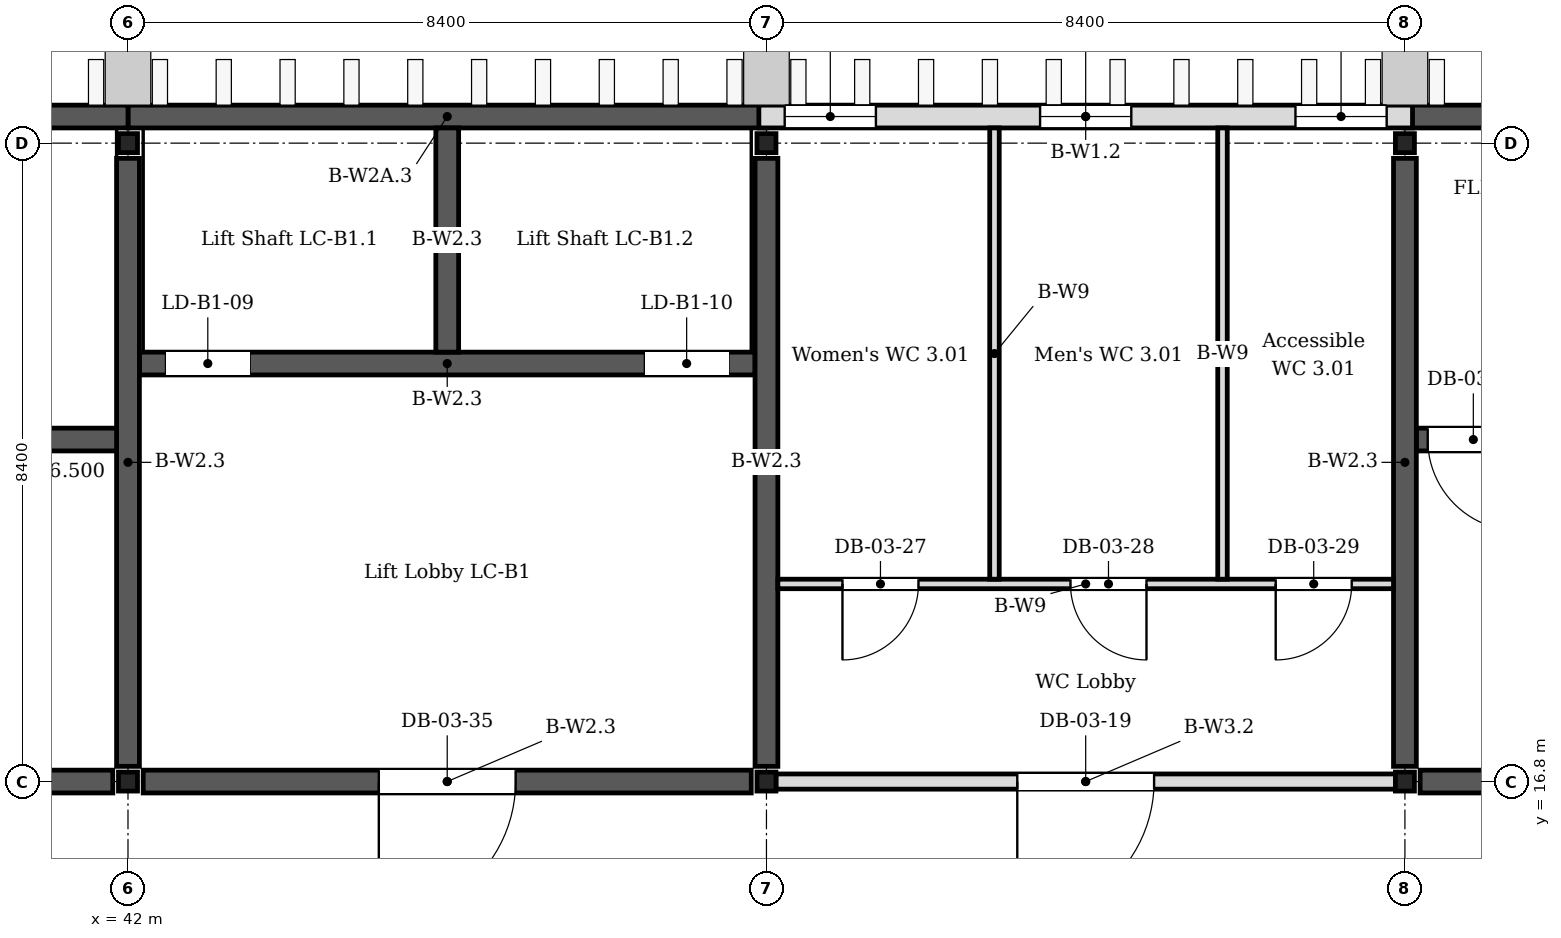
"""IFC4 building model, lengths in metres.
Left out: names, types, materials, properties, quantities, classifications, styles, units other than length and angle.
Written with IfcOpenShell. Run it as: python <this file> out.ifc"""

import sys

from ifc_helpers import new_model, si_unit, direction, frame, frame_2d, origin, origin_2d, place, context, subcontext, project, spatial, rectangle, i_section, extrude, element, fill, save


model = new_model("IFC4")
c1 = context("Model", 3, precision=1e-05, world=origin(), true_north=direction((0.0, 1.0)))
c2 = subcontext(c1, "Body", "Model", "MODEL_VIEW")
j1 = project(units=[si_unit("LENGTHUNIT", "METRE"), si_unit("PLANEANGLEUNIT", "RADIAN")], contexts=[c1])
p1 = place(None, origin())
s1 = spatial("IfcSite", under=j1, at=p1, CompositionType="ELEMENT")
p2 = place(p1, origin())
s2 = spatial("IfcBuilding", under=s1, at=p2, CompositionType="ELEMENT")
p3 = place(p2, frame((0.0, 0.0, 14.4)))
s3 = spatial("IfcBuildingStorey", under=s2, at=p3, CompositionType="ELEMENT", Elevation=14.4)
for number, where, z_axis, x_axis in (
    (1, (42.0, 16.8, 0.0), (0.0, 0.0, 1.0), (1.0, 0.0, 0.0)),
    (2, (42.0, 25.2, 0.0), (0.0, 0.0, 1.0), (1.0, 0.0, 0.0)),
    (3, (50.4, 16.8, 0.0), (0.0, 0.0, 1.0), (1.0, 0.0, 0.0)),
    (4, (50.4, 25.2, 0.0), (0.0, 0.0, 1.0), (1.0, 0.0, 0.0)),
    (5, (58.8, 16.8, 0.0), (0.0, 0.0, 1.0), (1.0, 0.0, 0.0)),
    (6, (58.8, 25.2, 0.0), (0.0, 0.0, 1.0), (1.0, 0.0, 0.0)),
):
    element("IfcColumn", number, at=place(p3, frame(where, z_axis=z_axis, x_axis=x_axis)), inside=s3, PredefinedType="COLUMN", context=c2, shape_type="SweptSolid", body=[
        extrude(i_section(OverallWidth=0.25, OverallDepth=0.25, WebThickness=0.009, FlangeThickness=0.014, FilletRadius=0.013, at=origin_2d()), origin(), (0.0, 0.0, 1.0), 3.95),
    ])
for number, where, z_axis, x_axis in (
    (7, (42.0, 17.0, 0.0), (0.0, 0.0, 1.0), (0.0, 1.0, 0.0)),
    (8, (50.4, 17.0, 0.0), (0.0, 0.0, 1.0), (0.0, 1.0, 0.0)),
):
    element("IfcWall", number, at=place(p3, frame(where, z_axis=z_axis, x_axis=x_axis)), inside=s3, PredefinedType="SHEAR", context=c2, shape_type="SweptSolid", body=[
        extrude(rectangle(XDim=8.0, YDim=0.3, at=frame_2d((4.0, 0.0))), origin(), (0.0, 0.0, 1.0), 3.95),
    ])
p4 = place(p3, frame((42.2, 16.8, 0.0), z_axis=(0.0, 0.0, 1.0), x_axis=(1.0, 0.0, 0.0)))
e9 = element("IfcWall", 9, at=p4, inside=s3, PredefinedType="SHEAR", context=c2, shape_type="SweptSolid", body=[
    extrude(rectangle(XDim=8.0, YDim=0.3, at=frame_2d((4.0, 0.0))), origin(), (0.0, 0.0, 1.0), 3.95),
])
p5 = place(p4, frame((3.1, 0.0, 0.0)))
e10 = element("IfcOpeningElement", 10, at=p5, cuts=e9, PredefinedType="OPENING", context=c2, shape_type="SweptSolid", body=[
    extrude(rectangle(XDim=1.8, YDim=2.1, at=frame_2d((0.9, 1.05))), frame((0.0, 0.16, 0.0), z_axis=(0.0, -1.0, 0.0), x_axis=(1.0, 0.0, 0.0)), (0.0, 0.0, 1.0), 0.32),
])
p6 = place(p3, frame((42.15, 22.3, 0.0), z_axis=(0.0, 0.0, 1.0), x_axis=(1.0, 0.0, 0.0)))
e11 = element("IfcWall", 11, at=p6, inside=s3, PredefinedType="SHEAR", context=c2, shape_type="SweptSolid", body=[
    extrude(rectangle(XDim=8.1, YDim=0.3, at=frame_2d((4.05, 0.0))), origin(), (0.0, 0.0, 1.0), 3.95),
])
p7 = place(p6, frame((0.35, 0.0, 0.0)))
e12 = element("IfcOpeningElement", 12, at=p7, cuts=e11, PredefinedType="OPENING", context=c2, shape_type="SweptSolid", body=[
    extrude(rectangle(XDim=1.1, YDim=2.2, at=frame_2d((0.55, 1.1))), frame((0.0, 0.16, 0.0), z_axis=(0.0, -1.0, 0.0), x_axis=(1.0, 0.0, 0.0)), (0.0, 0.0, 1.0), 0.32),
])
p8 = place(p6, frame((6.65, 0.0, 0.0)))
e13 = element("IfcOpeningElement", 13, at=p8, cuts=e11, PredefinedType="OPENING", context=c2, shape_type="SweptSolid", body=[
    extrude(rectangle(XDim=1.1, YDim=2.2, at=frame_2d((0.55, 1.1))), frame((0.0, 0.16, 0.0), z_axis=(0.0, -1.0, 0.0), x_axis=(1.0, 0.0, 0.0)), (0.0, 0.0, 1.0), 0.32),
])
p9 = place(p3, frame((42.0, 25.55, 0.0), z_axis=(0.0, 0.0, 1.0), x_axis=(1.0, 0.0, 0.0)))
e14 = element("IfcWall", 14, at=p9, inside=s3, PredefinedType="SHEAR", context=c2, shape_type="SweptSolid", body=[
    extrude(rectangle(XDim=8.4, YDim=0.3, at=frame_2d((4.2, 0.0))), origin(), (0.0, 0.0, 1.0), 3.95),
])
p10 = place(p3, frame((46.2, 22.45, 0.0), z_axis=(0.0, 0.0, 1.0), x_axis=(0.0, 1.0, 0.0)))
e15 = element("IfcWall", 15, at=p10, inside=s3, PredefinedType="SHEAR", context=c2, shape_type="SweptSolid", body=[
    extrude(rectangle(XDim=2.95, YDim=0.3, at=frame_2d((1.475, 0.0))), origin(), (0.0, 0.0, 1.0), 3.95),
])
p11 = place(p3, frame((33.8, 16.8, 0.0), z_axis=(0.0, 0.0, 1.0), x_axis=(1.0, 0.0, 0.0)))
e16 = element("IfcWall", 16, at=p11, inside=s3, PredefinedType="SHEAR", context=c2, shape_type="SweptSolid", body=[
    extrude(rectangle(XDim=8.0, YDim=0.3, at=frame_2d((4.0, 0.0))), origin(), (0.0, 0.0, 1.0), 3.95),
])
p12 = place(p11, frame((3.1, 0.0, 0.0)))
e17 = element("IfcOpeningElement", 17, at=p12, cuts=e16, PredefinedType="OPENING", context=c2, shape_type="SweptSolid", body=[
    extrude(rectangle(XDim=1.8, YDim=2.1, at=frame_2d((0.9, 1.05))), frame((0.0, 0.16, 0.0), z_axis=(0.0, -1.0, 0.0), x_axis=(1.0, 0.0, 0.0)), (0.0, 0.0, 1.0), 0.32),
])
p13 = place(p3, frame((33.75, 21.3, 0.0), z_axis=(0.0, 0.0, 1.0), x_axis=(1.0, 0.0, 0.0)))
e18 = element("IfcWall", 18, at=p13, inside=s3, PredefinedType="SHEAR", context=c2, shape_type="SweptSolid", body=[
    extrude(rectangle(XDim=8.1, YDim=0.3, at=frame_2d((4.05, 0.0))), origin(), (0.0, 0.0, 1.0), 3.95),
])
p14 = place(p13, frame((0.15, 0.0, 0.0)))
e19 = element("IfcOpeningElement", 19, at=p14, cuts=e18, PredefinedType="OPENING", context=c2, shape_type="SweptSolid", body=[
    extrude(rectangle(XDim=1.2, YDim=2.1, at=frame_2d((0.6, 1.05))), frame((0.0, 0.16, 0.0), z_axis=(0.0, -1.0, 0.0), x_axis=(1.0, 0.0, 0.0)), (0.0, 0.0, 1.0), 0.32),
])
p15 = place(p3, frame((33.6, 25.55, 0.0), z_axis=(0.0, 0.0, 1.0), x_axis=(1.0, 0.0, 0.0)))
e20 = element("IfcWall", 20, at=p15, inside=s3, PredefinedType="SHEAR", context=c2, shape_type="SweptSolid", body=[
    extrude(rectangle(XDim=8.4, YDim=0.3, at=frame_2d((4.2, 0.0))), origin(), (0.0, 0.0, 1.0), 3.95),
])
p16 = place(p3, frame((58.8, 17.0, 0.0), z_axis=(0.0, 0.0, 1.0), x_axis=(0.0, 1.0, 0.0)))
e21 = element("IfcWall", 21, at=p16, inside=s3, PredefinedType="SHEAR", context=c2, shape_type="SweptSolid", body=[
    extrude(rectangle(XDim=8.0, YDim=0.3, at=frame_2d((4.0, 0.0))), origin(), (0.0, 0.0, 1.0), 3.95),
])
p17 = place(p3, frame((59.0, 16.8, 0.0), z_axis=(0.0, 0.0, 1.0), x_axis=(1.0, 0.0, 0.0)))
e22 = element("IfcWall", 22, at=p17, inside=s3, PredefinedType="SHEAR", context=c2, shape_type="SweptSolid", body=[
    extrude(rectangle(XDim=8.0, YDim=0.3, at=frame_2d((4.0, 0.0))), origin(), (0.0, 0.0, 1.0), 3.95),
])
p18 = place(p17, frame((3.1, 0.0, 0.0)))
e23 = element("IfcOpeningElement", 23, at=p18, cuts=e22, PredefinedType="OPENING", context=c2, shape_type="SweptSolid", body=[
    extrude(rectangle(XDim=1.8, YDim=2.1, at=frame_2d((0.9, 1.05))), frame((0.0, 0.16, 0.0), z_axis=(0.0, -1.0, 0.0), x_axis=(1.0, 0.0, 0.0)), (0.0, 0.0, 1.0), 0.32),
])
p19 = place(p3, frame((58.95, 21.3, 0.0), z_axis=(0.0, 0.0, 1.0), x_axis=(1.0, 0.0, 0.0)))
e24 = element("IfcWall", 24, at=p19, inside=s3, PredefinedType="SHEAR", context=c2, shape_type="SweptSolid", body=[
    extrude(rectangle(XDim=8.1, YDim=0.3, at=frame_2d((4.05, 0.0))), origin(), (0.0, 0.0, 1.0), 3.95),
])
p20 = place(p19, frame((0.15, 0.0, 0.0)))
e25 = element("IfcOpeningElement", 25, at=p20, cuts=e24, PredefinedType="OPENING", context=c2, shape_type="SweptSolid", body=[
    extrude(rectangle(XDim=1.2, YDim=2.1, at=frame_2d((0.6, 1.05))), frame((0.0, 0.16, 0.0), z_axis=(0.0, -1.0, 0.0), x_axis=(1.0, 0.0, 0.0)), (0.0, 0.0, 1.0), 0.32),
])
p21 = place(p3, frame((58.8, 25.55, 0.0), z_axis=(0.0, 0.0, 1.0), x_axis=(1.0, 0.0, 0.0)))
e26 = element("IfcWall", 26, at=p21, inside=s3, PredefinedType="SHEAR", context=c2, shape_type="SweptSolid", body=[
    extrude(rectangle(XDim=8.4, YDim=0.3, at=frame_2d((4.2, 0.0))), origin(), (0.0, 0.0, 1.0), 3.95),
])
p22 = place(p3, frame((50.3, 25.55, 0.0), z_axis=(0.0, 0.0, 1.0), x_axis=(1.0, 0.0, 0.0)))
e27 = element("IfcWall", 27, at=p22, inside=s3, PredefinedType="SOLIDWALL", context=c2, shape_type="SweptSolid", body=[
    extrude(rectangle(XDim=8.6, YDim=0.3, at=frame_2d((4.3, 0.0))), origin(), (0.0, 0.0, 1.0), 3.95),
])
p23 = place(p22, frame((0.34, 0.0, 1.5)))
e28 = element("IfcOpeningElement", 28, at=p23, cuts=e27, PredefinedType="OPENING", context=c2, shape_type="SweptSolid", body=[
    extrude(rectangle(XDim=1.2, YDim=1.2, at=frame_2d((0.6, 0.6))), frame((0.0, 0.16, 0.0), z_axis=(0.0, -1.0, 0.0), x_axis=(1.0, 0.0, 0.0)), (0.0, 0.0, 1.0), 0.32),
])
p24 = place(p22, frame((3.7, 0.0, 1.5)))
e29 = element("IfcOpeningElement", 29, at=p24, cuts=e27, PredefinedType="OPENING", context=c2, shape_type="SweptSolid", body=[
    extrude(rectangle(XDim=1.2, YDim=1.2, at=frame_2d((0.6, 0.6))), frame((0.0, 0.16, 0.0), z_axis=(0.0, -1.0, 0.0), x_axis=(1.0, 0.0, 0.0)), (0.0, 0.0, 1.0), 0.32),
])
p25 = place(p22, frame((7.06, 0.0, 1.5)))
e30 = element("IfcOpeningElement", 30, at=p25, cuts=e27, PredefinedType="OPENING", context=c2, shape_type="SweptSolid", body=[
    extrude(rectangle(XDim=1.2, YDim=1.2, at=frame_2d((0.6, 0.6))), frame((0.0, 0.16, 0.0), z_axis=(0.0, -1.0, 0.0), x_axis=(1.0, 0.0, 0.0)), (0.0, 0.0, 1.0), 0.32),
])
p26 = place(p3, frame((50.525, 16.8, 0.0), z_axis=(0.0, 0.0, 1.0), x_axis=(1.0, 0.0, 0.0)))
e31 = element("IfcWall", 31, at=p26, inside=s3, PredefinedType="PARTITIONING", context=c2, shape_type="SweptSolid", body=[
    extrude(rectangle(XDim=8.15, YDim=0.2, at=frame_2d((4.075, 0.0))), origin(), (0.0, 0.0, 1.0), 3.25),
])
p27 = place(p26, frame((3.175, 0.0, 0.0)))
e32 = element("IfcOpeningElement", 32, at=p27, cuts=e31, PredefinedType="OPENING", context=c2, shape_type="SweptSolid", body=[
    extrude(rectangle(XDim=1.8, YDim=2.1, at=frame_2d((0.9, 1.05))), frame((0.0, 0.11, 0.0), z_axis=(0.0, -1.0, 0.0), x_axis=(1.0, 0.0, 0.0)), (0.0, 0.0, 1.0), 0.22),
])
p28 = place(p3, frame((50.55, 19.4, 0.0), z_axis=(0.0, 0.0, 1.0), x_axis=(1.0, 0.0, 0.0)))
e33 = element("IfcWall", 33, at=p28, inside=s3, PredefinedType="PARTITIONING", context=c2, shape_type="SweptSolid", body=[
    extrude(rectangle(XDim=8.1, YDim=0.125, at=frame_2d((4.05, 0.0))), origin(), (0.0, 0.0, 1.0), 3.25),
])
p29 = place(p28, frame((0.85, 0.0, 0.0)))
e34 = element("IfcOpeningElement", 34, at=p29, cuts=e33, PredefinedType="OPENING", context=c2, shape_type="SweptSolid", body=[
    extrude(rectangle(XDim=1.0, YDim=2.1, at=frame_2d((0.5, 1.05))), frame((0.0, 0.073, 0.0), z_axis=(0.0, -1.0, 0.0), x_axis=(1.0, 0.0, 0.0)), (0.0, 0.0, 1.0), 0.145),
])
p30 = place(p28, frame((3.85, 0.0, 0.0)))
e35 = element("IfcOpeningElement", 35, at=p30, cuts=e33, PredefinedType="OPENING", context=c2, shape_type="SweptSolid", body=[
    extrude(rectangle(XDim=1.0, YDim=2.1, at=frame_2d((0.5, 1.05))), frame((0.0, 0.073, 0.0), z_axis=(0.0, -1.0, 0.0), x_axis=(1.0, 0.0, 0.0)), (0.0, 0.0, 1.0), 0.145),
])
p31 = place(p28, frame((6.55, 0.0, 0.0)))
e36 = element("IfcOpeningElement", 36, at=p31, cuts=e33, PredefinedType="OPENING", context=c2, shape_type="SweptSolid", body=[
    extrude(rectangle(XDim=1.0, YDim=2.1, at=frame_2d((0.5, 1.05))), frame((0.0, 0.073, 0.0), z_axis=(0.0, -1.0, 0.0), x_axis=(1.0, 0.0, 0.0)), (0.0, 0.0, 1.0), 0.145),
])
for number, where, z_axis, x_axis in (
    (37, (53.4, 19.462, 0.0), (0.0, 0.0, 1.0), (0.0, 1.0, 0.0)),
    (38, (56.4, 19.462, 0.0), (0.0, 0.0, 1.0), (0.0, 1.0, 0.0)),
):
    element("IfcWall", number, at=place(p3, frame(where, z_axis=z_axis, x_axis=x_axis)), inside=s3, PredefinedType="PARTITIONING", context=c2, shape_type="SweptSolid", body=[
        extrude(rectangle(XDim=5.938, YDim=0.125, at=frame_2d((2.969, 0.0))), origin(), (0.0, 0.0, 1.0), 3.25),
    ])
p32 = place(p23, origin())
e39 = element("IfcWindow", 39, at=p32, inside=s3, PartitioningType="SINGLE_PANEL", PredefinedType="WINDOW", context=c2, shape_type="SweptSolid", body=[
    extrude(rectangle(XDim=1.2, YDim=1.2, at=frame_2d((0.6, 0.6))), frame((0.0, 0.03, 0.0), z_axis=(0.0, -1.0, 0.0), x_axis=(1.0, 0.0, 0.0)), (0.0, 0.0, 1.0), 0.06),
])
fill(e28, e39)
p33 = place(p24, origin())
e40 = element("IfcWindow", 40, at=p33, inside=s3, PartitioningType="SINGLE_PANEL", PredefinedType="WINDOW", context=c2, shape_type="SweptSolid", body=[
    extrude(rectangle(XDim=1.2, YDim=1.2, at=frame_2d((0.6, 0.6))), frame((0.0, 0.03, 0.0), z_axis=(0.0, -1.0, 0.0), x_axis=(1.0, 0.0, 0.0)), (0.0, 0.0, 1.0), 0.06),
])
fill(e29, e40)
p34 = place(p25, origin())
e41 = element("IfcWindow", 41, at=p34, inside=s3, PartitioningType="SINGLE_PANEL", PredefinedType="WINDOW", context=c2, shape_type="SweptSolid", body=[
    extrude(rectangle(XDim=1.2, YDim=1.2, at=frame_2d((0.6, 0.6))), frame((0.0, 0.03, 0.0), z_axis=(0.0, -1.0, 0.0), x_axis=(1.0, 0.0, 0.0)), (0.0, 0.0, 1.0), 0.06),
])
fill(e30, e41)
p35 = place(p27, origin())
e42 = element("IfcDoor", 42, at=p35, inside=s3, OperationType="DOUBLE_DOOR_SINGLE_SWING", PredefinedType="DOOR", context=c2, shape_type="SweptSolid", body=[
    extrude(rectangle(XDim=1.8, YDim=2.1, at=frame_2d((0.9, 1.05))), frame((0.0, 0.025, 0.0), z_axis=(0.0, -1.0, 0.0), x_axis=(1.0, 0.0, 0.0)), (0.0, 0.0, 1.0), 0.05),
])
fill(e32, e42)
p36 = place(p29, origin())
e43 = element("IfcDoor", 43, at=p36, inside=s3, OperationType="SINGLE_SWING_LEFT", PredefinedType="DOOR", context=c2, shape_type="SweptSolid", body=[
    extrude(rectangle(XDim=1.0, YDim=2.1, at=frame_2d((0.5, 1.05))), frame((0.0, 0.025, 0.0), z_axis=(0.0, -1.0, 0.0), x_axis=(1.0, 0.0, 0.0)), (0.0, 0.0, 1.0), 0.05),
])
fill(e34, e43)
p37 = place(p30, origin())
e44 = element("IfcDoor", 44, at=p37, inside=s3, OperationType="SINGLE_SWING_LEFT", PredefinedType="DOOR", context=c2, shape_type="SweptSolid", body=[
    extrude(rectangle(XDim=1.0, YDim=2.1, at=frame_2d((0.5, 1.05))), frame((0.0, 0.025, 0.0), z_axis=(0.0, -1.0, 0.0), x_axis=(1.0, 0.0, 0.0)), (0.0, 0.0, 1.0), 0.05),
])
fill(e35, e44)
p38 = place(p31, origin())
e45 = element("IfcDoor", 45, at=p38, inside=s3, OperationType="SINGLE_SWING_LEFT", PredefinedType="DOOR", context=c2, shape_type="SweptSolid", body=[
    extrude(rectangle(XDim=1.0, YDim=2.1, at=frame_2d((0.5, 1.05))), frame((0.0, 0.025, 0.0), z_axis=(0.0, -1.0, 0.0), x_axis=(1.0, 0.0, 0.0)), (0.0, 0.0, 1.0), 0.05),
])
fill(e36, e45)
p39 = place(p5, origin())
e46 = element("IfcDoor", 46, at=p39, inside=s3, OperationType="DOUBLE_DOOR_SINGLE_SWING", PredefinedType="DOOR", context=c2, shape_type="SweptSolid", body=[
    extrude(rectangle(XDim=1.8, YDim=2.1, at=frame_2d((0.9, 1.05))), frame((0.0, 0.025, 0.0), z_axis=(0.0, -1.0, 0.0), x_axis=(1.0, 0.0, 0.0)), (0.0, 0.0, 1.0), 0.05),
])
fill(e10, e46)
p40 = place(p7, origin())
e47 = element("IfcDoor", 47, at=p40, inside=s3, OperationType="SLIDING_TO_LEFT", PredefinedType="DOOR", context=c2, shape_type="SweptSolid", body=[
    extrude(rectangle(XDim=1.1, YDim=2.2, at=frame_2d((0.55, 1.1))), frame((0.0, 0.025, 0.0), z_axis=(0.0, -1.0, 0.0), x_axis=(1.0, 0.0, 0.0)), (0.0, 0.0, 1.0), 0.05),
])
fill(e12, e47)
p41 = place(p8, origin())
e48 = element("IfcDoor", 48, at=p41, inside=s3, OperationType="SLIDING_TO_LEFT", PredefinedType="DOOR", context=c2, shape_type="SweptSolid", body=[
    extrude(rectangle(XDim=1.1, YDim=2.2, at=frame_2d((0.55, 1.1))), frame((0.0, 0.025, 0.0), z_axis=(0.0, -1.0, 0.0), x_axis=(1.0, 0.0, 0.0)), (0.0, 0.0, 1.0), 0.05),
])
fill(e13, e48)
p42 = place(p20, origin())
e49 = element("IfcDoor", 49, at=p42, inside=s3, OperationType="SINGLE_SWING_LEFT", PredefinedType="DOOR", context=c2, shape_type="SweptSolid", body=[
    extrude(rectangle(XDim=1.2, YDim=2.1, at=frame_2d((0.6, 1.05))), frame((0.0, 0.025, 0.0), z_axis=(0.0, -1.0, 0.0), x_axis=(1.0, 0.0, 0.0)), (0.0, 0.0, 1.0), 0.05),
])
fill(e25, e49)
save(model, sys.argv[1])
